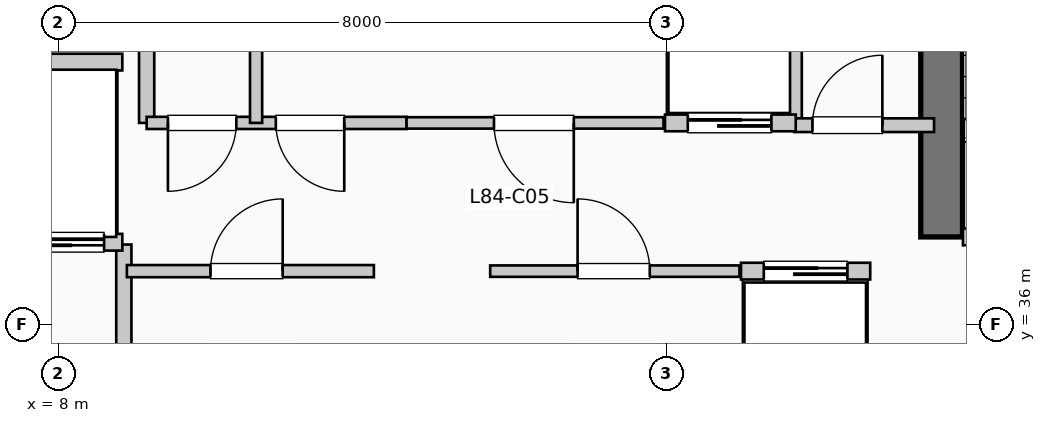
"""IFC4 building model, lengths in metres.
Left out: names, types, materials, properties, quantities, classifications, styles, units other than length and angle.
Written with IfcOpenShell. Run it as: python <this file> out.ifc"""

import sys

from ifc_helpers import new_model, si_unit, direction, frame, frame_2d, origin, place, context, subcontext, project, spatial, rectangle, extrude, element, fill, save


model = new_model("IFC4")
c1 = context("Model", 3, precision=1e-05, world=origin(), true_north=direction((0.0, 1.0)))
c2 = subcontext(c1, "Body", "Model", "MODEL_VIEW")
j1 = project(units=[si_unit("LENGTHUNIT", "METRE"), si_unit("PLANEANGLEUNIT", "RADIAN")], contexts=[c1])
p1 = place(None, origin())
s1 = spatial("IfcSite", under=j1, at=p1, CompositionType="ELEMENT")
p2 = place(p1, origin())
s2 = spatial("IfcBuilding", under=s1, at=p2, CompositionType="ELEMENT")
p3 = place(p2, frame((0.0, 0.0, 343.53)))
s3 = spatial("IfcBuildingStorey", under=s2, at=p3, CompositionType="ELEMENT", Elevation=343.53)
p4 = place(p3, frame((19.62, 37.15, 0.0), z_axis=(0.0, 0.0, 1.0), x_axis=(0.0, 1.0, 0.0)))
e1 = element("IfcWall", 1, at=p4, inside=s3, PredefinedType="SHEAR", context=c2, shape_type="SweptSolid", body=[
    extrude(rectangle(XDim=7.89, YDim=0.55, at=frame_2d((3.945, 0.0))), origin(), (0.0, 0.0, 1.0), 3.96),
])
p5 = place(p3, frame((8.86, 34.55, 0.0), z_axis=(0.0, 0.0, 1.0), x_axis=(0.0, 1.0, 0.0)))
e2 = element("IfcWall", 2, at=p5, inside=s3, PredefinedType="PARTITIONING", context=c2, shape_type="SweptSolid", body=[
    extrude(rectangle(XDim=2.5, YDim=0.2, at=frame_2d((1.25, 0.0))), origin(), (0.0, 0.0, 1.0), 3.71),
])
p6 = place(p3, frame((19.9, 37.15, 0.0), z_axis=(0.0, 0.0, 1.0), x_axis=(1.0, 0.0, 0.0)))
e3 = element("IfcWall", 3, at=p6, inside=s3, PredefinedType="PARTITIONING", context=c2, shape_type="SweptSolid", body=[
    extrude(rectangle(XDim=3.15, YDim=0.22, at=frame_2d((1.575, 0.0))), origin(), (0.0, 0.0, 1.0), 3.71),
])
p7 = place(p6, frame((2.05, 0.0, 0.0), z_axis=(0.0, 0.0, 1.0), x_axis=(-1.0, 0.0, 0.0)))
e4 = element("IfcOpeningElement", 4, at=p7, cuts=e3, PredefinedType="OPENING", context=c2, shape_type="SweptSolid", body=[
    extrude(rectangle(XDim=1.05, YDim=2.15, at=frame_2d((0.525, 1.075))), frame((0.0, 0.12, 0.0), z_axis=(0.0, -1.0, 0.0), x_axis=(1.0, 0.0, 0.0)), (0.0, 0.0, 1.0), 0.24),
])
p8 = place(p3, frame((5.38, 37.08, 0.0), z_axis=(0.0, 0.0, 1.0), x_axis=(1.0, 0.0, 0.0)))
e5 = element("IfcWall", 5, at=p8, inside=s3, PredefinedType="PARTITIONING", context=c2, shape_type="SweptSolid", body=[
    extrude(rectangle(XDim=3.46, YDim=0.22, at=frame_2d((1.73, 0.0))), origin(), (0.0, 0.0, 1.0), 3.71),
])
p9 = place(p8, frame((1.55, 0.0, 0.0), z_axis=(0.0, 0.0, 1.0), x_axis=(-1.0, 0.0, 0.0)))
e6 = element("IfcOpeningElement", 6, at=p9, cuts=e5, PredefinedType="OPENING", context=c2, shape_type="SweptSolid", body=[
    extrude(rectangle(XDim=1.2, YDim=2.2, at=frame_2d((0.6, 1.1))), frame((0.0, 0.12, 0.0), z_axis=(0.0, -1.0, 0.0), x_axis=(1.0, 0.0, 0.0)), (0.0, 0.0, 1.0), 0.24),
])
p10 = place(p8, frame((3.22, 0.0, 0.0), z_axis=(0.0, 0.0, 1.0), x_axis=(-1.0, 0.0, 0.0)))
e7 = element("IfcOpeningElement", 7, at=p10, cuts=e5, PredefinedType="OPENING", context=c2, shape_type="SweptSolid", body=[
    extrude(rectangle(XDim=1.2, YDim=2.2, at=frame_2d((0.6, 1.1))), frame((0.0, 0.12, 0.0), z_axis=(0.0, -1.0, 0.0), x_axis=(1.0, 0.0, 0.0)), (0.0, 0.0, 1.0), 0.24),
])
p11 = place(p3, frame((5.38, 39.45, 0.0), z_axis=(0.0, 0.0, 1.0), x_axis=(1.0, 0.0, 0.0)))
e8 = element("IfcWall", 8, at=p11, inside=s3, PredefinedType="PARTITIONING", context=c2, shape_type="SweptSolid", body=[
    extrude(rectangle(XDim=3.46, YDim=0.22, at=frame_2d((1.73, 0.0))), origin(), (0.0, 0.0, 1.0), 3.71),
])
for number, where, z_axis, x_axis in (
    (9, (9.16, 38.65, 0.0), (0.0, 0.0, 1.0), (0.0, 1.0, 0.0)),
    (10, (17.68, 38.65, 0.0), (0.0, 0.0, 1.0), (0.0, 1.0, 0.0)),
):
    element("IfcWall", number, at=place(p3, frame(where, z_axis=z_axis, x_axis=x_axis)), inside=s3, PredefinedType="PARTITIONING", context=c2, shape_type="SweptSolid", body=[
        extrude(rectangle(XDim=2.35, YDim=0.2, at=frame_2d((1.175, 0.0))), origin(), (0.0, 0.0, 1.0), 3.71),
    ])
p12 = place(p3, frame((17.68, 38.62, 0.0), z_axis=(0.0, 0.0, 1.0), x_axis=(1.0, 0.0, 0.0)))
e11 = element("IfcWall", 11, at=p12, inside=s3, PredefinedType="PARTITIONING", context=c2, shape_type="SweptSolid", body=[
    extrude(rectangle(XDim=1.84, YDim=0.18, at=frame_2d((0.92, 0.0))), origin(), (0.0, 0.0, 1.0), 3.71),
])
p13 = place(p12, frame((0.24, 0.0, 0.0)))
e12 = element("IfcOpeningElement", 12, at=p13, cuts=e11, PredefinedType="OPENING", context=c2, shape_type="SweptSolid", body=[
    extrude(rectangle(XDim=0.92, YDim=2.1, at=frame_2d((0.46, 1.05))), frame((0.0, 0.1, 0.0), z_axis=(0.0, -1.0, 0.0), x_axis=(1.0, 0.0, 0.0)), (0.0, 0.0, 1.0), 0.2),
])
p14 = place(p3, frame((8.9, 36.7, 0.0), z_axis=(0.0, 0.0, 1.0), x_axis=(1.0, 0.0, 0.0)))
e13 = element("IfcWall", 13, at=p14, inside=s3, PredefinedType="PARTITIONING", context=c2, shape_type="SweptSolid", body=[
    extrude(rectangle(XDim=3.25, YDim=0.16, at=frame_2d((1.625, 0.0))), origin(), (0.0, 0.0, 1.0), 3.71),
])
p15 = place(p14, frame((1.1, 0.0, 0.0)))
e14 = element("IfcOpeningElement", 14, at=p15, cuts=e13, PredefinedType="OPENING", context=c2, shape_type="SweptSolid", body=[
    extrude(rectangle(XDim=0.95, YDim=2.15, at=frame_2d((0.475, 1.075))), frame((0.0, 0.09, 0.0), z_axis=(0.0, -1.0, 0.0), x_axis=(1.0, 0.0, 0.0)), (0.0, 0.0, 1.0), 0.18),
])
p16 = place(p3, frame((9.16, 38.65, 0.0), z_axis=(0.0, 0.0, 1.0), x_axis=(1.0, 0.0, 0.0)))
e15 = element("IfcWall", 15, at=p16, inside=s3, PredefinedType="PARTITIONING", context=c2, shape_type="SweptSolid", body=[
    extrude(rectangle(XDim=3.42, YDim=0.16, at=frame_2d((1.71, 0.0))), origin(), (0.0, 0.0, 1.0), 3.71),
])
p17 = place(p16, frame((1.18, 0.0, 0.0), z_axis=(0.0, 0.0, 1.0), x_axis=(-1.0, 0.0, 0.0)))
e16 = element("IfcOpeningElement", 16, at=p17, cuts=e15, PredefinedType="OPENING", context=c2, shape_type="SweptSolid", body=[
    extrude(rectangle(XDim=0.9, YDim=2.15, at=frame_2d((0.45, 1.075))), frame((0.0, 0.09, 0.0), z_axis=(0.0, -1.0, 0.0), x_axis=(1.0, 0.0, 0.0)), (0.0, 0.0, 1.0), 0.18),
])
p18 = place(p16, frame((2.6, 0.0, 0.0), z_axis=(0.0, 0.0, 1.0), x_axis=(-1.0, 0.0, 0.0)))
e17 = element("IfcOpeningElement", 17, at=p18, cuts=e15, PredefinedType="OPENING", context=c2, shape_type="SweptSolid", body=[
    extrude(rectangle(XDim=0.9, YDim=2.15, at=frame_2d((0.45, 1.075))), frame((0.0, 0.09, 0.0), z_axis=(0.0, -1.0, 0.0), x_axis=(1.0, 0.0, 0.0)), (0.0, 0.0, 1.0), 0.18),
])
p19 = place(p3, frame((10.6, 38.65, 0.0), z_axis=(0.0, 0.0, 1.0), x_axis=(0.0, 1.0, 0.0)))
e18 = element("IfcWall", 18, at=p19, inside=s3, PredefinedType="PARTITIONING", context=c2, shape_type="SweptSolid", body=[
    extrude(rectangle(XDim=2.35, YDim=0.16, at=frame_2d((1.175, 0.0))), origin(), (0.0, 0.0, 1.0), 3.71),
])
p20 = place(p3, frame((13.68, 36.7, 0.0), z_axis=(0.0, 0.0, 1.0), x_axis=(1.0, 0.0, 0.0)))
e19 = element("IfcWall", 19, at=p20, inside=s3, PredefinedType="PARTITIONING", context=c2, shape_type="SweptSolid", body=[
    extrude(rectangle(XDim=3.28, YDim=0.15, at=frame_2d((1.64, 0.0))), origin(), (0.0, 0.0, 1.0), 3.71),
])
p21 = place(p20, frame((1.15, 0.0, 0.0)))
e20 = element("IfcOpeningElement", 20, at=p21, cuts=e19, PredefinedType="OPENING", context=c2, shape_type="SweptSolid", body=[
    extrude(rectangle(XDim=0.95, YDim=2.15, at=frame_2d((0.475, 1.075))), frame((0.0, 0.085, 0.0), z_axis=(0.0, -1.0, 0.0), x_axis=(1.0, 0.0, 0.0)), (0.0, 0.0, 1.0), 0.17),
])
p22 = place(p3, frame((12.58, 38.65, 0.0), z_axis=(0.0, 0.0, 1.0), x_axis=(1.0, 0.0, 0.0)))
e21 = element("IfcWall", 21, at=p22, inside=s3, PredefinedType="PARTITIONING", context=c2, shape_type="SweptSolid", body=[
    extrude(rectangle(XDim=3.38, YDim=0.15, at=frame_2d((1.69, 0.0))), origin(), (0.0, 0.0, 1.0), 3.71),
])
p23 = place(p22, frame((2.2, 0.0, 0.0), z_axis=(0.0, 0.0, 1.0), x_axis=(-1.0, 0.0, 0.0)))
e22 = element("IfcOpeningElement", 22, at=p23, cuts=e21, PredefinedType="OPENING", context=c2, shape_type="SweptSolid", body=[
    extrude(rectangle(XDim=1.05, YDim=2.15, at=frame_2d((0.525, 1.075))), frame((0.0, 0.085, 0.0), z_axis=(0.0, -1.0, 0.0), x_axis=(1.0, 0.0, 0.0)), (0.0, 0.0, 1.0), 0.17),
])
p24 = place(p3, frame((16.98, 36.7, 0.0), z_axis=(0.0, 0.0, 1.0), x_axis=(1.0, 0.0, 0.0)))
e23 = element("IfcWall", 23, at=p24, inside=s3, PredefinedType="PARTITIONING", context=c2, shape_type="SweptSolid", body=[
    extrude(rectangle(XDim=1.7, YDim=0.22, at=frame_2d((0.85, 0.0))), origin(), (0.0, 0.0, 1.0), 3.71),
])
p25 = place(p24, frame((0.3, 0.0, 0.0)))
e24 = element("IfcOpeningElement", 24, at=p25, cuts=e23, PredefinedType="OPENING", context=c2, shape_type="SweptSolid", body=[
    extrude(rectangle(XDim=1.1, YDim=2.2, at=frame_2d((0.55, 1.1))), frame((0.0, 0.12, 0.0), z_axis=(0.0, -1.0, 0.0), x_axis=(1.0, 0.0, 0.0)), (0.0, 0.0, 1.0), 0.24),
])
p26 = place(p3, frame((15.98, 38.65, 0.0), z_axis=(0.0, 0.0, 1.0), x_axis=(1.0, 0.0, 0.0)))
e25 = element("IfcWall", 25, at=p26, inside=s3, PredefinedType="PARTITIONING", context=c2, shape_type="SweptSolid", body=[
    extrude(rectangle(XDim=1.72, YDim=0.22, at=frame_2d((0.86, 0.0))), origin(), (0.0, 0.0, 1.0), 3.71),
])
p27 = place(p26, frame((0.3, 0.0, 0.0)))
e26 = element("IfcOpeningElement", 26, at=p27, cuts=e25, PredefinedType="OPENING", context=c2, shape_type="SweptSolid", body=[
    extrude(rectangle(XDim=1.1, YDim=2.2, at=frame_2d((0.55, 1.1))), frame((0.0, 0.12, 0.0), z_axis=(0.0, -1.0, 0.0), x_axis=(1.0, 0.0, 0.0)), (0.0, 0.0, 1.0), 0.24),
])
p28 = place(p10, origin())
e27 = element("IfcDoor", 27, at=p28, inside=s3, OperationType="SLIDING_TO_RIGHT", PredefinedType="DOOR", context=c2, shape_type="SweptSolid", body=[
    extrude(rectangle(XDim=1.2, YDim=2.2, at=frame_2d((0.6, 1.1))), frame((0.0, 0.025, 0.0), z_axis=(0.0, -1.0, 0.0), x_axis=(1.0, 0.0, 0.0)), (0.0, 0.0, 1.0), 0.05),
])
fill(e7, e27)
p29 = place(p13, origin())
e28 = element("IfcDoor", 28, at=p29, inside=s3, OperationType="SINGLE_SWING_RIGHT", PredefinedType="DOOR", context=c2, shape_type="SweptSolid", body=[
    extrude(rectangle(XDim=0.92, YDim=2.1, at=frame_2d((0.46, 1.05))), frame((0.0, 0.025, 0.0), z_axis=(0.0, -1.0, 0.0), x_axis=(1.0, 0.0, 0.0)), (0.0, 0.0, 1.0), 0.05),
])
fill(e12, e28)
p30 = place(p15, origin())
e29 = element("IfcDoor", 29, at=p30, inside=s3, OperationType="SINGLE_SWING_RIGHT", PredefinedType="DOOR", context=c2, shape_type="SweptSolid", body=[
    extrude(rectangle(XDim=0.95, YDim=2.15, at=frame_2d((0.475, 1.075))), frame((0.0, 0.025, 0.0), z_axis=(0.0, -1.0, 0.0), x_axis=(1.0, 0.0, 0.0)), (0.0, 0.0, 1.0), 0.05),
])
fill(e14, e29)
p31 = place(p17, origin())
e30 = element("IfcDoor", 30, at=p31, inside=s3, OperationType="SINGLE_SWING_LEFT", PredefinedType="DOOR", context=c2, shape_type="SweptSolid", body=[
    extrude(rectangle(XDim=0.9, YDim=2.15, at=frame_2d((0.45, 1.075))), frame((0.0, 0.025, 0.0), z_axis=(0.0, -1.0, 0.0), x_axis=(1.0, 0.0, 0.0)), (0.0, 0.0, 1.0), 0.05),
])
fill(e16, e30)
p32 = place(p18, origin())
e31 = element("IfcDoor", 31, at=p32, inside=s3, OperationType="SINGLE_SWING_RIGHT", PredefinedType="DOOR", context=c2, shape_type="SweptSolid", body=[
    extrude(rectangle(XDim=0.9, YDim=2.15, at=frame_2d((0.45, 1.075))), frame((0.0, 0.025, 0.0), z_axis=(0.0, -1.0, 0.0), x_axis=(1.0, 0.0, 0.0)), (0.0, 0.0, 1.0), 0.05),
])
fill(e17, e31)
p33 = place(p21, origin())
e32 = element("IfcDoor", 32, at=p33, inside=s3, OperationType="SINGLE_SWING_LEFT", PredefinedType="DOOR", context=c2, shape_type="SweptSolid", body=[
    extrude(rectangle(XDim=0.95, YDim=2.15, at=frame_2d((0.475, 1.075))), frame((0.0, 0.025, 0.0), z_axis=(0.0, -1.0, 0.0), x_axis=(1.0, 0.0, 0.0)), (0.0, 0.0, 1.0), 0.05),
])
fill(e20, e32)
p34 = place(p23, origin())
e33 = element("IfcDoor", 33, at=p34, inside=s3, OperationType="SINGLE_SWING_RIGHT", PredefinedType="DOOR", context=c2, shape_type="SweptSolid", body=[
    extrude(rectangle(XDim=1.05, YDim=2.15, at=frame_2d((0.525, 1.075))), frame((0.0, 0.025, 0.0), z_axis=(0.0, -1.0, 0.0), x_axis=(1.0, 0.0, 0.0)), (0.0, 0.0, 1.0), 0.05),
])
fill(e22, e33)
p35 = place(p25, origin())
e34 = element("IfcDoor", 34, at=p35, inside=s3, OperationType="SLIDING_TO_LEFT", PredefinedType="DOOR", context=c2, shape_type="SweptSolid", body=[
    extrude(rectangle(XDim=1.1, YDim=2.2, at=frame_2d((0.55, 1.1))), frame((0.0, 0.025, 0.0), z_axis=(0.0, -1.0, 0.0), x_axis=(1.0, 0.0, 0.0)), (0.0, 0.0, 1.0), 0.05),
])
fill(e24, e34)
p36 = place(p27, origin())
e35 = element("IfcDoor", 35, at=p36, inside=s3, OperationType="SLIDING_TO_LEFT", PredefinedType="DOOR", context=c2, shape_type="SweptSolid", body=[
    extrude(rectangle(XDim=1.1, YDim=2.2, at=frame_2d((0.55, 1.1))), frame((0.0, 0.025, 0.0), z_axis=(0.0, -1.0, 0.0), x_axis=(1.0, 0.0, 0.0)), (0.0, 0.0, 1.0), 0.05),
])
fill(e26, e35)
save(model, sys.argv[1])
